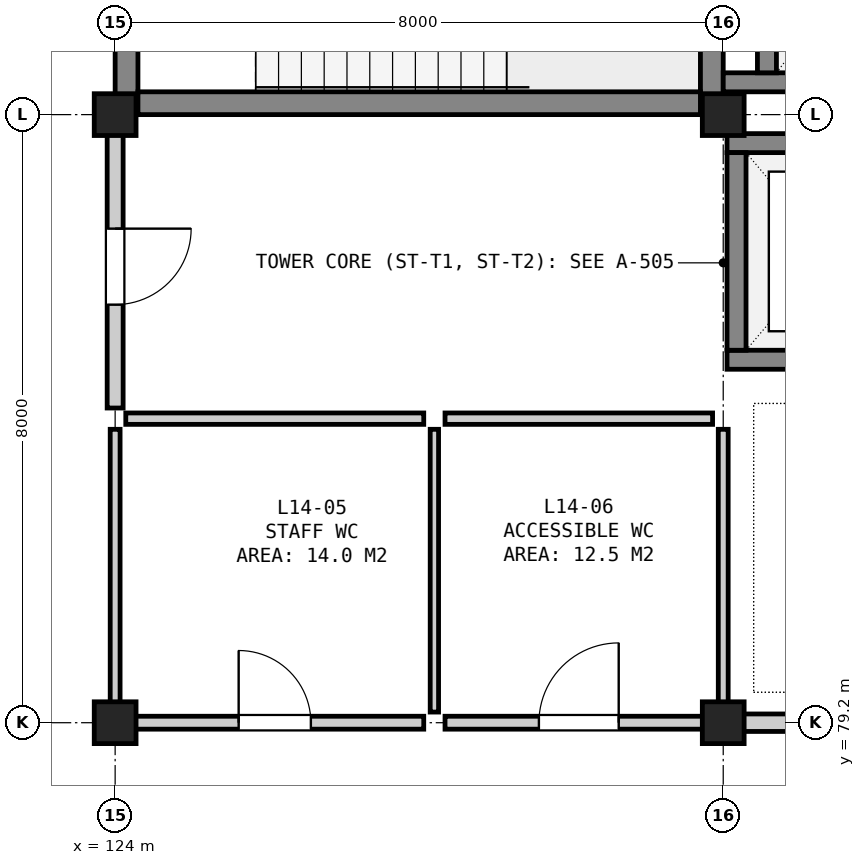
"""IFC4 building model, lengths in metres.
Left out: names, types, materials, properties, quantities, classifications, styles, units other than length and angle.
Written with IfcOpenShell. Run it as: python <this file> out.ifc"""

import sys

from ifc_helpers import new_model, si_unit, direction, frame, frame_2d, origin, origin_2d, place, context, subcontext, project, spatial, rectangle, extrude, element, fill, save


model = new_model("IFC4")
c1 = context("Model", 3, precision=1e-05, world=origin(), true_north=direction((0.0, 1.0)))
c2 = subcontext(c1, "Body", "Model", "MODEL_VIEW")
j1 = project(units=[si_unit("LENGTHUNIT", "METRE"), si_unit("PLANEANGLEUNIT", "RADIAN")], contexts=[c1])
p1 = place(None, origin())
s1 = spatial("IfcSite", under=j1, at=p1, CompositionType="ELEMENT")
p2 = place(p1, origin())
s2 = spatial("IfcBuilding", under=s1, at=p2, CompositionType="ELEMENT")
p3 = place(p2, frame((0.0, 0.0, 58.7)))
s3 = spatial("IfcBuildingStorey", under=s2, at=p3, CompositionType="ELEMENT", Elevation=58.7)
for number, where, z_axis, x_axis in (
    (1, (124.0, 79.2, 0.0), (0.0, 0.0, 1.0), (1.0, 0.0, 0.0)),
    (2, (124.0, 87.2, 0.0), (0.0, 0.0, 1.0), (1.0, 0.0, 0.0)),
    (3, (132.0, 79.2, 0.0), (0.0, 0.0, 1.0), (1.0, 0.0, 0.0)),
    (4, (132.0, 87.2, 0.0), (0.0, 0.0, 1.0), (1.0, 0.0, 0.0)),
):
    element("IfcColumn", number, at=place(p3, frame(where, z_axis=z_axis, x_axis=x_axis)), inside=s3, PredefinedType="COLUMN", context=c2, shape_type="SweptSolid", body=[
        extrude(rectangle(XDim=0.55, YDim=0.55, at=origin_2d()), origin(), (0.0, 0.0, 1.0), 3.95),
    ])
for number, where, z_axis, x_axis in (
    (5, (124.15, 87.2, 0.0), (0.0, 0.0, 1.0), (0.0, 1.0, 0.0)),
    (6, (131.85, 87.2, 0.0), (0.0, 0.0, 1.0), (0.0, 1.0, 0.0)),
):
    element("IfcWall", number, at=place(p3, frame(where, z_axis=z_axis, x_axis=x_axis)), inside=s3, PredefinedType="SHEAR", context=c2, shape_type="SweptSolid", body=[
        extrude(rectangle(XDim=4.2, YDim=0.3, at=frame_2d((2.1, 0.0))), origin(), (0.0, 0.0, 1.0), 3.67),
    ])
p4 = place(p3, frame((124.3, 87.35, 0.0), z_axis=(0.0, 0.0, 1.0), x_axis=(1.0, 0.0, 0.0)))
e7 = element("IfcWall", 7, at=p4, inside=s3, PredefinedType="SHEAR", context=c2, shape_type="SweptSolid", body=[
    extrude(rectangle(XDim=7.4, YDim=0.3, at=frame_2d((3.7, 0.0))), origin(), (0.0, 0.0, 1.0), 3.67),
])
p5 = place(p3, frame((132.0, 87.625, 0.0), z_axis=(0.0, 0.0, 1.0), x_axis=(1.0, 0.0, 0.0)))
e8 = element("IfcWall", 8, at=p5, inside=s3, PredefinedType="SHEAR", context=c2, shape_type="SweptSolid", body=[
    extrude(rectangle(XDim=3.15, YDim=0.25, at=frame_2d((1.575, 0.0))), origin(), (0.0, 0.0, 1.0), 3.67),
])
p6 = place(p3, frame((132.575, 87.75, 0.0), z_axis=(0.0, 0.0, 1.0), x_axis=(0.0, 1.0, 0.0)))
e9 = element("IfcWall", 9, at=p6, inside=s3, PredefinedType="SHEAR", context=c2, shape_type="SweptSolid", body=[
    extrude(rectangle(XDim=2.9, YDim=0.25, at=frame_2d((1.45, 0.0))), origin(), (0.0, 0.0, 1.0), 3.67),
])
p7 = place(p3, frame((132.05, 83.975, 0.0), z_axis=(0.0, 0.0, 1.0), x_axis=(1.0, 0.0, 0.0)))
e10 = element("IfcWall", 10, at=p7, inside=s3, PredefinedType="SHEAR", context=c2, shape_type="SweptSolid", body=[
    extrude(rectangle(XDim=2.7, YDim=0.25, at=frame_2d((1.35, 0.0))), origin(), (0.0, 0.0, 1.0), 3.67),
])
p8 = place(p7, frame((0.8, 0.0, 0.0)))
e11 = element("IfcOpeningElement", 11, at=p8, cuts=e10, PredefinedType="OPENING", context=c2, shape_type="SweptSolid", body=[
    extrude(rectangle(XDim=1.1, YDim=2.15, at=frame_2d((0.55, 1.075))), frame((0.0, 0.137, 0.0), z_axis=(0.0, -1.0, 0.0), x_axis=(1.0, 0.0, 0.0)), (0.0, 0.0, 1.0), 0.274),
])
p9 = place(p3, frame((132.05, 86.825, 0.0), z_axis=(0.0, 0.0, 1.0), x_axis=(1.0, 0.0, 0.0)))
e12 = element("IfcWall", 12, at=p9, inside=s3, PredefinedType="SHEAR", context=c2, shape_type="SweptSolid", body=[
    extrude(rectangle(XDim=2.7, YDim=0.25, at=frame_2d((1.35, 0.0))), origin(), (0.0, 0.0, 1.0), 3.67),
])
p10 = place(p3, frame((132.175, 84.1, 0.0), z_axis=(0.0, 0.0, 1.0), x_axis=(0.0, 1.0, 0.0)))
e13 = element("IfcWall", 13, at=p10, inside=s3, PredefinedType="SHEAR", context=c2, shape_type="SweptSolid", body=[
    extrude(rectangle(XDim=2.6, YDim=0.25, at=frame_2d((1.3, 0.0))), origin(), (0.0, 0.0, 1.0), 3.67),
])
p11 = place(p3, frame((124.14, 79.2, 0.0), z_axis=(0.0, 0.0, 1.0), x_axis=(1.0, 0.0, 0.0)))
e14 = element("IfcWall", 14, at=p11, inside=s3, PredefinedType="PARTITIONING", context=c2, shape_type="SweptSolid", body=[
    extrude(rectangle(XDim=3.92, YDim=0.17, at=frame_2d((1.96, 0.0))), origin(), (0.0, 0.0, 1.0), 3.045),
])
p12 = place(p11, frame((1.485, 0.0, 0.0)))
e15 = element("IfcOpeningElement", 15, at=p12, cuts=e14, PredefinedType="OPENING", context=c2, shape_type="SweptSolid", body=[
    extrude(rectangle(XDim=0.95, YDim=2.15, at=frame_2d((0.475, 1.075))), frame((0.0, 0.097, 0.0), z_axis=(0.0, -1.0, 0.0), x_axis=(1.0, 0.0, 0.0)), (0.0, 0.0, 1.0), 0.194),
])
p13 = place(p3, frame((124.14, 83.2, 0.0), z_axis=(0.0, 0.0, 1.0), x_axis=(1.0, 0.0, 0.0)))
e16 = element("IfcWall", 16, at=p13, inside=s3, PredefinedType="PARTITIONING", context=c2, shape_type="SweptSolid", body=[
    extrude(rectangle(XDim=3.92, YDim=0.15, at=frame_2d((1.96, 0.0))), origin(), (0.0, 0.0, 1.0), 3.67),
])
p14 = place(p3, frame((124.0, 79.34, 0.0), z_axis=(0.0, 0.0, 1.0), x_axis=(0.0, 1.0, 0.0)))
e17 = element("IfcWall", 17, at=p14, inside=s3, PredefinedType="PARTITIONING", context=c2, shape_type="SweptSolid", body=[
    extrude(rectangle(XDim=3.72, YDim=0.13, at=frame_2d((1.86, 0.0))), origin(), (0.0, 0.0, 1.0), 3.045),
])
p15 = place(p3, frame((128.2, 79.34, 0.0), z_axis=(0.0, 0.0, 1.0), x_axis=(0.0, 1.0, 0.0)))
e18 = element("IfcWall", 18, at=p15, inside=s3, PredefinedType="PARTITIONING", context=c2, shape_type="SweptSolid", body=[
    extrude(rectangle(XDim=3.72, YDim=0.11, at=frame_2d((1.86, 0.0))), origin(), (0.0, 0.0, 1.0), 3.67),
])
p16 = place(p3, frame((128.34, 79.2, 0.0), z_axis=(0.0, 0.0, 1.0), x_axis=(1.0, 0.0, 0.0)))
e19 = element("IfcWall", 19, at=p16, inside=s3, PredefinedType="PARTITIONING", context=c2, shape_type="SweptSolid", body=[
    extrude(rectangle(XDim=3.52, YDim=0.17, at=frame_2d((1.76, 0.0))), origin(), (0.0, 0.0, 1.0), 3.045),
])
p17 = place(p16, frame((1.235, 0.0, 0.0)))
e20 = element("IfcOpeningElement", 20, at=p17, cuts=e19, PredefinedType="OPENING", context=c2, shape_type="SweptSolid", body=[
    extrude(rectangle(XDim=1.05, YDim=2.15, at=frame_2d((0.525, 1.075))), frame((0.0, 0.097, 0.0), z_axis=(0.0, -1.0, 0.0), x_axis=(1.0, 0.0, 0.0)), (0.0, 0.0, 1.0), 0.194),
])
p18 = place(p3, frame((128.34, 83.2, 0.0), z_axis=(0.0, 0.0, 1.0), x_axis=(1.0, 0.0, 0.0)))
e21 = element("IfcWall", 21, at=p18, inside=s3, PredefinedType="PARTITIONING", context=c2, shape_type="SweptSolid", body=[
    extrude(rectangle(XDim=3.52, YDim=0.15, at=frame_2d((1.76, 0.0))), origin(), (0.0, 0.0, 1.0), 3.67),
])
p19 = place(p3, frame((132.0, 79.34, 0.0), z_axis=(0.0, 0.0, 1.0), x_axis=(0.0, 1.0, 0.0)))
e22 = element("IfcWall", 22, at=p19, inside=s3, PredefinedType="PARTITIONING", context=c2, shape_type="SweptSolid", body=[
    extrude(rectangle(XDim=3.72, YDim=0.13, at=frame_2d((1.86, 0.0))), origin(), (0.0, 0.0, 1.0), 2.795),
])
p20 = place(p3, frame((124.0, 83.34, 0.0), z_axis=(0.0, 0.0, 1.0), x_axis=(0.0, 1.0, 0.0)))
e23 = element("IfcWall", 23, at=p20, inside=s3, PredefinedType="SOLIDWALL", context=c2, shape_type="SweptSolid", body=[
    extrude(rectangle(XDim=3.72, YDim=0.21, at=frame_2d((1.86, 0.0))), origin(), (0.0, 0.0, 1.0), 3.045),
])
p21 = place(p20, frame((1.36, 0.0, 0.0)))
e24 = element("IfcOpeningElement", 24, at=p21, cuts=e23, PredefinedType="OPENING", context=c2, shape_type="SweptSolid", body=[
    extrude(rectangle(XDim=1.0, YDim=2.15, at=frame_2d((0.5, 1.075))), frame((0.0, 0.117, 0.0), z_axis=(0.0, -1.0, 0.0), x_axis=(1.0, 0.0, 0.0)), (0.0, 0.0, 1.0), 0.234),
])
p22 = place(p3, frame((132.14, 79.2, 0.0), z_axis=(0.0, 0.0, 1.0), x_axis=(1.0, 0.0, 0.0)))
e25 = element("IfcWall", 25, at=p22, inside=s3, PredefinedType="SOLIDWALL", context=c2, shape_type="SweptSolid", body=[
    extrude(rectangle(XDim=7.72, YDim=0.23, at=frame_2d((3.86, 0.0))), origin(), (0.0, 0.0, 1.0), 3.045),
])
p23 = place(p22, frame((3.11, 0.0, 0.0)))
e26 = element("IfcOpeningElement", 26, at=p23, cuts=e25, PredefinedType="OPENING", context=c2, shape_type="SweptSolid", body=[
    extrude(rectangle(XDim=1.5, YDim=2.2, at=frame_2d((0.75, 1.1))), frame((0.0, 0.127, 0.0), z_axis=(0.0, -1.0, 0.0), x_axis=(1.0, 0.0, 0.0)), (0.0, 0.0, 1.0), 0.254),
])
p24 = place(p12, origin())
e27 = element("IfcDoor", 27, at=p24, inside=s3, OperationType="SINGLE_SWING_LEFT", PredefinedType="DOOR", context=c2, shape_type="SweptSolid", body=[
    extrude(rectangle(XDim=0.95, YDim=2.15, at=frame_2d((0.475, 1.075))), frame((0.0, 0.025, 0.0), z_axis=(0.0, -1.0, 0.0), x_axis=(1.0, 0.0, 0.0)), (0.0, 0.0, 1.0), 0.05),
])
fill(e15, e27)
p25 = place(p17, origin())
e28 = element("IfcDoor", 28, at=p25, inside=s3, OperationType="SINGLE_SWING_RIGHT", PredefinedType="DOOR", context=c2, shape_type="SweptSolid", body=[
    extrude(rectangle(XDim=1.05, YDim=2.15, at=frame_2d((0.525, 1.075))), frame((0.0, 0.025, 0.0), z_axis=(0.0, -1.0, 0.0), x_axis=(1.0, 0.0, 0.0)), (0.0, 0.0, 1.0), 0.05),
])
fill(e20, e28)
p26 = place(p21, frame((1.0, 0.0, 0.0), z_axis=(0.0, 0.0, 1.0), x_axis=(-1.0, 0.0, 0.0)))
e29 = element("IfcDoor", 29, at=p26, inside=s3, OperationType="SINGLE_SWING_LEFT", PredefinedType="DOOR", context=c2, shape_type="SweptSolid", body=[
    extrude(rectangle(XDim=1.0, YDim=2.15, at=frame_2d((0.5, 1.075))), frame((0.0, 0.025, 0.0), z_axis=(0.0, -1.0, 0.0), x_axis=(1.0, 0.0, 0.0)), (0.0, 0.0, 1.0), 0.05),
])
fill(e24, e29)
save(model, sys.argv[1])
